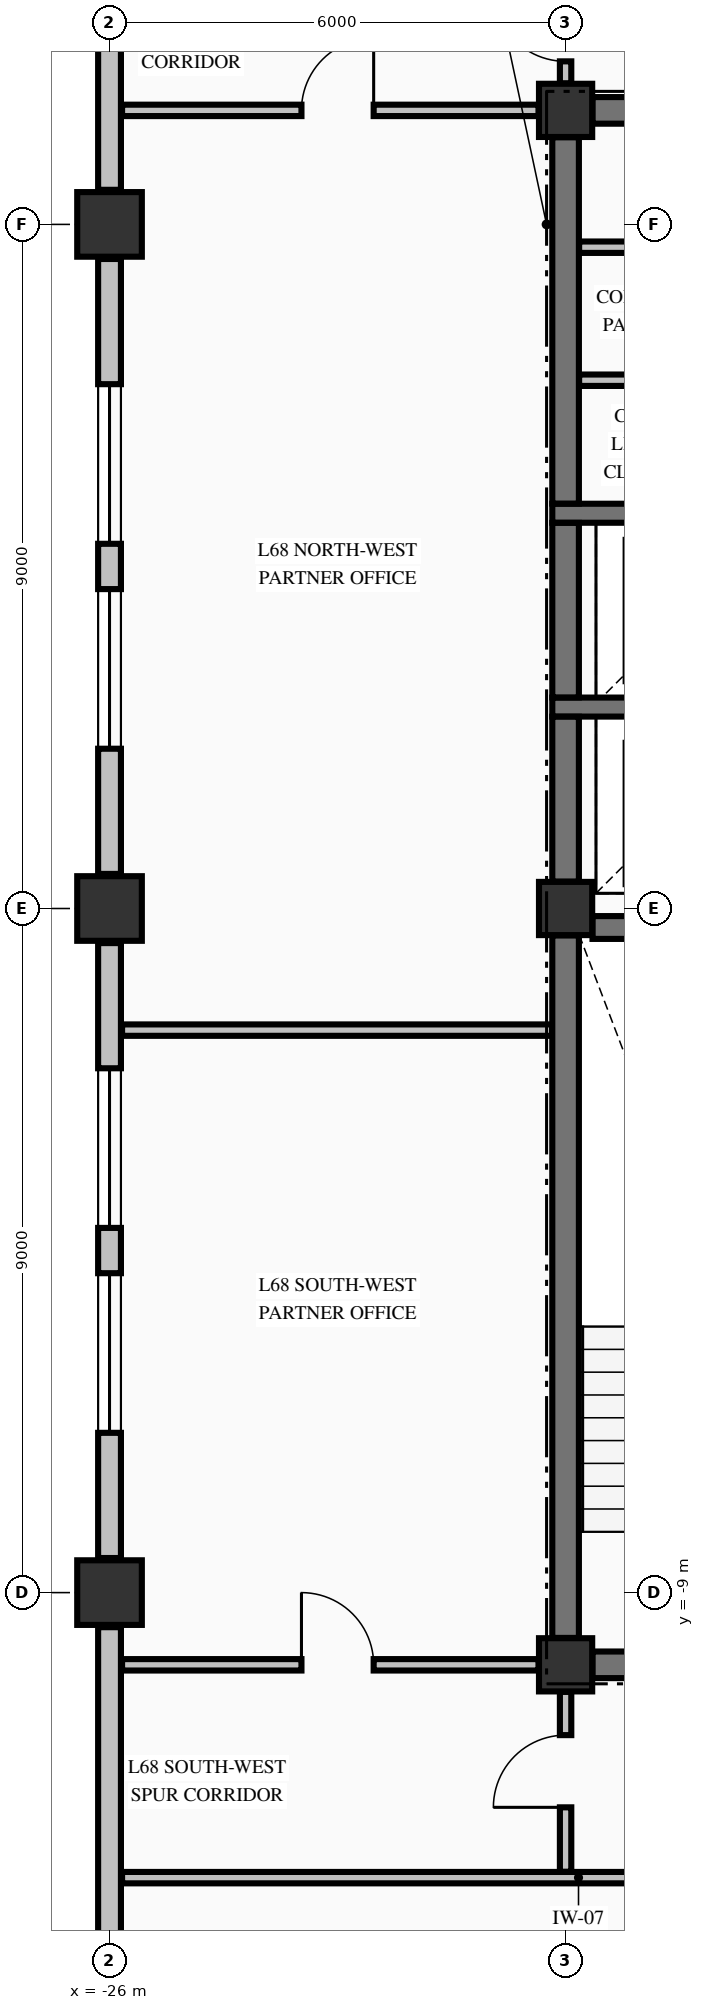
"""IFC4 building model, lengths in metres.
Left out: names, types, materials, properties, quantities, classifications, styles, units other than length and angle.
Written with IfcOpenShell. Run it as: python <this file> out.ifc"""

import sys

from ifc_helpers import new_model, si_unit, direction, frame, frame_2d, origin, origin_2d, place, context, subcontext, project, spatial, rectangle, extrude, element, fill, save


model = new_model("IFC4")
c1 = context("Model", 3, precision=1e-05, world=origin(), true_north=direction((0.0, 1.0)))
c2 = subcontext(c1, "Body", "Model", "MODEL_VIEW")
j1 = project(units=[si_unit("LENGTHUNIT", "METRE"), si_unit("PLANEANGLEUNIT", "RADIAN")], contexts=[c1])
p1 = place(None, origin())
s1 = spatial("IfcSite", under=j1, at=p1, CompositionType="ELEMENT")
p2 = place(p1, origin())
s2 = spatial("IfcBuilding", under=s1, at=p2, CompositionType="ELEMENT")
p3 = place(p2, frame((0.0, 0.0, 257.66)))
s3 = spatial("IfcBuildingStorey", under=s2, at=p3, CompositionType="ELEMENT", Elevation=257.66)
for number, where, z_axis, x_axis in (
    (1, (-26.0, -9.0, -0.25), (0.0, 0.0, 1.0), (1.0, 0.0, 0.0)),
    (2, (-26.0, 0.0, -0.25), (0.0, 0.0, 1.0), (1.0, 0.0, 0.0)),
    (3, (-26.0, 9.0, -0.25), (0.0, 0.0, 1.0), (1.0, 0.0, 0.0)),
):
    element("IfcColumn", number, at=place(p3, frame(where, z_axis=z_axis, x_axis=x_axis)), inside=s3, PredefinedType="COLUMN", context=c2, shape_type="SweptSolid", body=[
        extrude(rectangle(XDim=0.85, YDim=0.85, at=origin_2d()), origin(), (0.0, 0.0, 1.0), 3.23),
    ])
for number, where, z_axis, x_axis in (
    (4, (-20.0, -9.95, -0.25), (0.0, 0.0, 1.0), (1.0, 0.0, 0.0)),
    (5, (-20.0, 10.5, -0.25), (0.0, 0.0, 1.0), (1.0, 0.0, 0.0)),
    (6, (-20.0, 0.0, -0.25), (0.0, 0.0, 1.0), (1.0, 0.0, 0.0)),
):
    element("IfcColumn", number, at=place(p3, frame(where, z_axis=z_axis, x_axis=x_axis)), inside=s3, PredefinedType="COLUMN", context=c2, shape_type="SweptSolid", body=[
        extrude(rectangle(XDim=0.7, YDim=0.7, at=origin_2d()), origin(), (0.0, 0.0, 1.0), 3.23),
    ])
p4 = place(p3, frame((-26.0, -9.455, 0.0), z_axis=(0.0, 0.0, 1.0), x_axis=(0.0, -1.0, 0.0)))
e7 = element("IfcWall", 7, at=p4, inside=s3, PredefinedType="STANDARD", context=c2, shape_type="SweptSolid", body=[
    extrude(rectangle(XDim=8.09, YDim=0.3, at=frame_2d((4.045, 0.0))), origin(), (0.0, 0.0, 1.0), 2.372),
])
p5 = place(p3, frame((-26.0, -0.455, 0.0), z_axis=(0.0, 0.0, 1.0), x_axis=(0.0, -1.0, 0.0)))
e8 = element("IfcWall", 8, at=p5, inside=s3, PredefinedType="STANDARD", context=c2, shape_type="SweptSolid", body=[
    extrude(rectangle(XDim=8.09, YDim=0.3, at=frame_2d((4.045, 0.0))), origin(), (0.0, 0.0, 1.0), 2.372),
])
p6 = place(p5, frame((1.647, 0.0, 0.7)))
e9 = element("IfcOpeningElement", 9, at=p6, cuts=e8, PredefinedType="OPENING", context=c2, shape_type="SweptSolid", body=[
    extrude(rectangle(XDim=2.1, YDim=1.5, at=frame_2d((1.05, 0.75))), frame((0.0, 0.16, 0.0), z_axis=(0.0, -1.0, 0.0), x_axis=(1.0, 0.0, 0.0)), (0.0, 0.0, 1.0), 0.32),
])
p7 = place(p5, frame((4.343, 0.0, 0.7)))
e10 = element("IfcOpeningElement", 10, at=p7, cuts=e8, PredefinedType="OPENING", context=c2, shape_type="SweptSolid", body=[
    extrude(rectangle(XDim=2.1, YDim=1.5, at=frame_2d((1.05, 0.75))), frame((0.0, 0.16, 0.0), z_axis=(0.0, -1.0, 0.0), x_axis=(1.0, 0.0, 0.0)), (0.0, 0.0, 1.0), 0.32),
])
p8 = place(p3, frame((-26.0, 8.545, 0.0), z_axis=(0.0, 0.0, 1.0), x_axis=(0.0, -1.0, 0.0)))
e11 = element("IfcWall", 11, at=p8, inside=s3, PredefinedType="STANDARD", context=c2, shape_type="SweptSolid", body=[
    extrude(rectangle(XDim=8.09, YDim=0.3, at=frame_2d((4.045, 0.0))), origin(), (0.0, 0.0, 1.0), 2.372),
])
p9 = place(p8, frame((1.647, 0.0, 0.7)))
e12 = element("IfcOpeningElement", 12, at=p9, cuts=e11, PredefinedType="OPENING", context=c2, shape_type="SweptSolid", body=[
    extrude(rectangle(XDim=2.1, YDim=1.5, at=frame_2d((1.05, 0.75))), frame((0.0, 0.16, 0.0), z_axis=(0.0, -1.0, 0.0), x_axis=(1.0, 0.0, 0.0)), (0.0, 0.0, 1.0), 0.32),
])
p10 = place(p8, frame((4.343, 0.0, 0.7)))
e13 = element("IfcOpeningElement", 13, at=p10, cuts=e11, PredefinedType="OPENING", context=c2, shape_type="SweptSolid", body=[
    extrude(rectangle(XDim=2.1, YDim=1.5, at=frame_2d((1.05, 0.75))), frame((0.0, 0.16, 0.0), z_axis=(0.0, -1.0, 0.0), x_axis=(1.0, 0.0, 0.0)), (0.0, 0.0, 1.0), 0.32),
])
p11 = place(p3, frame((-26.0, 17.545, 0.0), z_axis=(0.0, 0.0, 1.0), x_axis=(0.0, -1.0, 0.0)))
e14 = element("IfcWall", 14, at=p11, inside=s3, PredefinedType="STANDARD", context=c2, shape_type="SweptSolid", body=[
    extrude(rectangle(XDim=8.09, YDim=0.3, at=frame_2d((4.045, 0.0))), origin(), (0.0, 0.0, 1.0), 2.372),
])
p12 = place(p3, frame((-19.646, -9.95, 0.0), z_axis=(0.0, 0.0, 1.0), x_axis=(1.0, 0.0, 0.0)))
e15 = element("IfcWall", 15, at=p12, inside=s3, PredefinedType="SHEAR", context=c2, shape_type="SweptSolid", body=[
    extrude(rectangle(XDim=4.946, YDim=0.35, at=frame_2d((2.473, 0.0))), origin(), (0.0, 0.0, 1.0), 2.98),
])
p13 = place(p12, frame((0.821, 0.0, 0.0)))
e16 = element("IfcOpeningElement", 16, at=p13, cuts=e15, PredefinedType="OPENING", context=c2, shape_type="SweptSolid", body=[
    extrude(rectangle(XDim=1.05, YDim=2.15, at=frame_2d((0.525, 1.075))), frame((0.0, 0.185, 0.0), z_axis=(0.0, -1.0, 0.0), x_axis=(1.0, 0.0, 0.0)), (0.0, 0.0, 1.0), 0.37),
])
p14 = place(p3, frame((-19.646, -0.25, 0.0), z_axis=(0.0, 0.0, 1.0), x_axis=(1.0, 0.0, 0.0)))
e17 = element("IfcWall", 17, at=p14, inside=s3, PredefinedType="SHEAR", context=c2, shape_type="SweptSolid", body=[
    extrude(rectangle(XDim=8.292, YDim=0.3, at=frame_2d((4.146, 0.0))), origin(), (0.0, 0.0, 1.0), 2.98),
])
p15 = place(p14, frame((5.946, 0.0, 0.0)))
e18 = element("IfcOpeningElement", 18, at=p15, cuts=e17, PredefinedType="OPENING", context=c2, shape_type="SweptSolid", body=[
    extrude(rectangle(XDim=1.1, YDim=2.15, at=frame_2d((0.55, 1.075))), frame((0.0, 0.16, 0.0), z_axis=(0.0, -1.0, 0.0), x_axis=(1.0, 0.0, 0.0)), (0.0, 0.0, 1.0), 0.32),
])
for number, where, z_axis, x_axis in (
    (19, (-20.175, 2.65, 0.0), (0.0, 0.0, 1.0), (1.0, 0.0, 0.0)),
    (20, (-20.175, 5.2, 0.0), (0.0, 0.0, 1.0), (1.0, 0.0, 0.0)),
):
    element("IfcWall", number, at=place(p3, frame(where, z_axis=z_axis, x_axis=x_axis)), inside=s3, PredefinedType="SOLIDWALL", context=c2, shape_type="SweptSolid", body=[
        extrude(rectangle(XDim=3.2, YDim=0.25, at=frame_2d((1.6, 0.0))), origin(), (0.0, 0.0, 1.0), 2.98),
    ])
p16 = place(p3, frame((-19.646, 10.5, 0.0), z_axis=(0.0, 0.0, 1.0), x_axis=(1.0, 0.0, 0.0)))
e21 = element("IfcWall", 21, at=p16, inside=s3, PredefinedType="SHEAR", context=c2, shape_type="SweptSolid", body=[
    extrude(rectangle(XDim=4.946, YDim=0.35, at=frame_2d((2.473, 0.0))), origin(), (0.0, 0.0, 1.0), 2.98),
])
p17 = place(p16, frame((3.196, 0.0, 0.0)))
e22 = element("IfcOpeningElement", 22, at=p17, cuts=e21, PredefinedType="OPENING", context=c2, shape_type="SweptSolid", body=[
    extrude(rectangle(XDim=1.1, YDim=2.15, at=frame_2d((0.55, 1.075))), frame((0.0, 0.185, 0.0), z_axis=(0.0, -1.0, 0.0), x_axis=(1.0, 0.0, 0.0)), (0.0, 0.0, 1.0), 0.37),
])
p18 = place(p3, frame((-25.835, -12.75, 0.0), z_axis=(0.0, 0.0, 1.0), x_axis=(1.0, 0.0, 0.0)))
e23 = element("IfcWall", 23, at=p18, inside=s3, PredefinedType="PARTITIONING", context=c2, shape_type="SweptSolid", body=[
    extrude(rectangle(XDim=45.91, YDim=0.15, at=frame_2d((22.955, 0.0))), origin(), (0.0, 0.0, 1.0), 2.98),
])
p19 = place(p18, frame((12.01, 0.0, 0.0)))
e24 = element("IfcOpeningElement", 24, at=p19, cuts=e23, PredefinedType="OPENING", context=c2, shape_type="SweptSolid", body=[
    extrude(rectangle(XDim=1.05, YDim=2.15, at=frame_2d((0.525, 1.075))), frame((0.0, 0.085, 0.0), z_axis=(0.0, -1.0, 0.0), x_axis=(1.0, 0.0, 0.0)), (0.0, 0.0, 1.0), 0.17),
])
p20 = place(p18, frame((23.11, 0.0, 0.0)))
e25 = element("IfcOpeningElement", 25, at=p20, cuts=e23, PredefinedType="OPENING", context=c2, shape_type="SweptSolid", body=[
    extrude(rectangle(XDim=1.05, YDim=2.15, at=frame_2d((0.525, 1.075))), frame((0.0, 0.085, 0.0), z_axis=(0.0, -1.0, 0.0), x_axis=(1.0, 0.0, 0.0)), (0.0, 0.0, 1.0), 0.17),
])
p21 = place(p18, frame((34.26, 0.0, 0.0)))
e26 = element("IfcOpeningElement", 26, at=p21, cuts=e23, PredefinedType="OPENING", context=c2, shape_type="SweptSolid", body=[
    extrude(rectangle(XDim=1.05, YDim=2.15, at=frame_2d((0.525, 1.075))), frame((0.0, 0.085, 0.0), z_axis=(0.0, -1.0, 0.0), x_axis=(1.0, 0.0, 0.0)), (0.0, 0.0, 1.0), 0.17),
])
p22 = place(p3, frame((-25.835, -9.95, 0.0), z_axis=(0.0, 0.0, 1.0), x_axis=(1.0, 0.0, 0.0)))
e27 = element("IfcWall", 27, at=p22, inside=s3, PredefinedType="PARTITIONING", context=c2, shape_type="SweptSolid", body=[
    extrude(rectangle(XDim=5.479, YDim=0.15, at=frame_2d((2.74, 0.0))), origin(), (0.0, 0.0, 1.0), 2.98),
])
p23 = place(p22, frame((2.36, 0.0, 0.0)))
e28 = element("IfcOpeningElement", 28, at=p23, cuts=e27, PredefinedType="OPENING", context=c2, shape_type="SweptSolid", body=[
    extrude(rectangle(XDim=0.95, YDim=2.15, at=frame_2d((0.475, 1.075))), frame((0.0, 0.085, 0.0), z_axis=(0.0, -1.0, 0.0), x_axis=(1.0, 0.0, 0.0)), (0.0, 0.0, 1.0), 0.17),
])
p24 = place(p3, frame((-25.835, -1.6, 0.0), z_axis=(0.0, 0.0, 1.0), x_axis=(1.0, 0.0, 0.0)))
e29 = element("IfcWall", 29, at=p24, inside=s3, PredefinedType="PARTITIONING", context=c2, shape_type="SweptSolid", body=[
    extrude(rectangle(XDim=5.657, YDim=0.15, at=frame_2d((2.829, 0.0))), origin(), (0.0, 0.0, 1.0), 2.98),
])
for number, where, z_axis, x_axis in (
    (30, (-19.822, 6.95, 0.0), (0.0, 0.0, 1.0), (1.0, 0.0, 0.0)),
    (31, (-19.822, 8.7, 0.0), (0.0, 0.0, 1.0), (1.0, 0.0, 0.0)),
):
    element("IfcWall", number, at=place(p3, frame(where, z_axis=z_axis, x_axis=x_axis)), inside=s3, PredefinedType="PARTITIONING", context=c2, shape_type="SweptSolid", body=[
        extrude(rectangle(XDim=2.822, YDim=0.15, at=frame_2d((1.411, 0.0))), origin(), (0.0, 0.0, 1.0), 2.98),
    ])
p25 = place(p3, frame((-25.835, 10.5, 0.0), z_axis=(0.0, 0.0, 1.0), x_axis=(1.0, 0.0, 0.0)))
e32 = element("IfcWall", 32, at=p25, inside=s3, PredefinedType="PARTITIONING", context=c2, shape_type="SweptSolid", body=[
    extrude(rectangle(XDim=5.479, YDim=0.15, at=frame_2d((2.74, 0.0))), origin(), (0.0, 0.0, 1.0), 2.98),
])
p26 = place(p25, frame((2.36, 0.0, 0.0)))
e33 = element("IfcOpeningElement", 33, at=p26, cuts=e32, PredefinedType="OPENING", context=c2, shape_type="SweptSolid", body=[
    extrude(rectangle(XDim=0.95, YDim=2.15, at=frame_2d((0.475, 1.075))), frame((0.0, 0.085, 0.0), z_axis=(0.0, -1.0, 0.0), x_axis=(1.0, 0.0, 0.0)), (0.0, 0.0, 1.0), 0.17),
])
p27 = place(p3, frame((-20.0, -9.596, 0.0), z_axis=(0.0, 0.0, 1.0), x_axis=(0.0, 1.0, 0.0)))
e34 = element("IfcWall", 34, at=p27, inside=s3, PredefinedType="SHEAR", context=c2, shape_type="SweptSolid", body=[
    extrude(rectangle(XDim=9.242, YDim=0.35, at=frame_2d((4.621, 0.0))), origin(), (0.0, 0.0, 1.0), 2.98),
])
p28 = place(p3, frame((-20.0, 0.354, 0.0), z_axis=(0.0, 0.0, 1.0), x_axis=(0.0, 1.0, 0.0)))
e35 = element("IfcWall", 35, at=p28, inside=s3, PredefinedType="SHEAR", context=c2, shape_type="SweptSolid", body=[
    extrude(rectangle(XDim=2.169, YDim=0.35, at=frame_2d((1.084, 0.0))), origin(), (0.0, 0.0, 1.0), 2.98),
])
p29 = place(p3, frame((-20.0, 2.777, 0.0), z_axis=(0.0, 0.0, 1.0), x_axis=(0.0, 1.0, 0.0)))
e36 = element("IfcWall", 36, at=p29, inside=s3, PredefinedType="SHEAR", context=c2, shape_type="SweptSolid", body=[
    extrude(rectangle(XDim=2.296, YDim=0.35, at=frame_2d((1.148, 0.0))), origin(), (0.0, 0.0, 1.0), 2.98),
])
p30 = place(p3, frame((-20.0, 5.327, 0.0), z_axis=(0.0, 0.0, 1.0), x_axis=(0.0, 1.0, 0.0)))
e37 = element("IfcWall", 37, at=p30, inside=s3, PredefinedType="SHEAR", context=c2, shape_type="SweptSolid", body=[
    extrude(rectangle(XDim=4.819, YDim=0.35, at=frame_2d((2.41, 0.0))), origin(), (0.0, 0.0, 1.0), 2.98),
])
p31 = place(p3, frame((-20.0, -12.672, 0.0), z_axis=(0.0, 0.0, 1.0), x_axis=(0.0, 1.0, 0.0)))
e38 = element("IfcWall", 38, at=p31, inside=s3, PredefinedType="PARTITIONING", context=c2, shape_type="SweptSolid", body=[
    extrude(rectangle(XDim=2.366, YDim=0.15, at=frame_2d((1.183, 0.0))), origin(), (0.0, 0.0, 1.0), 2.98),
])
p32 = place(p31, frame((0.847, 0.0, 0.0)))
e39 = element("IfcOpeningElement", 39, at=p32, cuts=e38, PredefinedType="OPENING", context=c2, shape_type="SweptSolid", body=[
    extrude(rectangle(XDim=0.95, YDim=2.15, at=frame_2d((0.475, 1.075))), frame((0.0, 0.085, 0.0), z_axis=(0.0, -1.0, 0.0), x_axis=(1.0, 0.0, 0.0)), (0.0, 0.0, 1.0), 0.17),
])
p33 = place(p3, frame((-20.0, 10.856, 0.0), z_axis=(0.0, 0.0, 1.0), x_axis=(0.0, 1.0, 0.0)))
e40 = element("IfcWall", 40, at=p33, inside=s3, PredefinedType="PARTITIONING", context=c2, shape_type="SweptSolid", body=[
    extrude(rectangle(XDim=1.816, YDim=0.15, at=frame_2d((0.908, 0.0))), origin(), (0.0, 0.0, 1.0), 2.98),
])
p34 = place(p33, frame((0.289, 0.0, 0.0)))
e41 = element("IfcOpeningElement", 41, at=p34, cuts=e40, PredefinedType="OPENING", context=c2, shape_type="SweptSolid", body=[
    extrude(rectangle(XDim=0.95, YDim=2.15, at=frame_2d((0.475, 1.075))), frame((0.0, 0.085, 0.0), z_axis=(0.0, -1.0, 0.0), x_axis=(1.0, 0.0, 0.0)), (0.0, 0.0, 1.0), 0.17),
])
p35 = place(p6, origin())
e42 = element("IfcWindow", 42, at=p35, inside=s3, PartitioningType="SINGLE_PANEL", PredefinedType="WINDOW", context=c2, shape_type="SweptSolid", body=[
    extrude(rectangle(XDim=2.1, YDim=1.5, at=frame_2d((1.05, 0.75))), frame((0.0, 0.03, 0.0), z_axis=(0.0, -1.0, 0.0), x_axis=(1.0, 0.0, 0.0)), (0.0, 0.0, 1.0), 0.06),
])
fill(e9, e42)
p36 = place(p7, origin())
e43 = element("IfcWindow", 43, at=p36, inside=s3, PartitioningType="SINGLE_PANEL", PredefinedType="WINDOW", context=c2, shape_type="SweptSolid", body=[
    extrude(rectangle(XDim=2.1, YDim=1.5, at=frame_2d((1.05, 0.75))), frame((0.0, 0.03, 0.0), z_axis=(0.0, -1.0, 0.0), x_axis=(1.0, 0.0, 0.0)), (0.0, 0.0, 1.0), 0.06),
])
fill(e10, e43)
p37 = place(p9, origin())
e44 = element("IfcWindow", 44, at=p37, inside=s3, PartitioningType="SINGLE_PANEL", PredefinedType="WINDOW", context=c2, shape_type="SweptSolid", body=[
    extrude(rectangle(XDim=2.1, YDim=1.5, at=frame_2d((1.05, 0.75))), frame((0.0, 0.03, 0.0), z_axis=(0.0, -1.0, 0.0), x_axis=(1.0, 0.0, 0.0)), (0.0, 0.0, 1.0), 0.06),
])
fill(e12, e44)
p38 = place(p10, origin())
e45 = element("IfcWindow", 45, at=p38, inside=s3, PartitioningType="SINGLE_PANEL", PredefinedType="WINDOW", context=c2, shape_type="SweptSolid", body=[
    extrude(rectangle(XDim=2.1, YDim=1.5, at=frame_2d((1.05, 0.75))), frame((0.0, 0.03, 0.0), z_axis=(0.0, -1.0, 0.0), x_axis=(1.0, 0.0, 0.0)), (0.0, 0.0, 1.0), 0.06),
])
fill(e13, e45)
p39 = place(p34, origin())
e46 = element("IfcDoor", 46, at=p39, inside=s3, OperationType="SINGLE_SWING_RIGHT", PredefinedType="DOOR", context=c2, shape_type="SweptSolid", body=[
    extrude(rectangle(XDim=0.95, YDim=2.15, at=frame_2d((0.475, 1.075))), frame((0.0, 0.025, 0.0), z_axis=(0.0, -1.0, 0.0), x_axis=(1.0, 0.0, 0.0)), (0.0, 0.0, 1.0), 0.05),
])
fill(e41, e46)
p40 = place(p32, origin())
e47 = element("IfcDoor", 47, at=p40, inside=s3, OperationType="SINGLE_SWING_LEFT", PredefinedType="DOOR", context=c2, shape_type="SweptSolid", body=[
    extrude(rectangle(XDim=0.95, YDim=2.15, at=frame_2d((0.475, 1.075))), frame((0.0, 0.025, 0.0), z_axis=(0.0, -1.0, 0.0), x_axis=(1.0, 0.0, 0.0)), (0.0, 0.0, 1.0), 0.05),
])
fill(e39, e47)
p41 = place(p26, origin())
e48 = element("IfcDoor", 48, at=p41, inside=s3, OperationType="SINGLE_SWING_RIGHT", PredefinedType="DOOR", context=c2, shape_type="SweptSolid", body=[
    extrude(rectangle(XDim=0.95, YDim=2.15, at=frame_2d((0.475, 1.075))), frame((0.0, 0.025, 0.0), z_axis=(0.0, -1.0, 0.0), x_axis=(1.0, 0.0, 0.0)), (0.0, 0.0, 1.0), 0.05),
])
fill(e33, e48)
p42 = place(p23, origin())
e49 = element("IfcDoor", 49, at=p42, inside=s3, OperationType="SINGLE_SWING_LEFT", PredefinedType="DOOR", context=c2, shape_type="SweptSolid", body=[
    extrude(rectangle(XDim=0.95, YDim=2.15, at=frame_2d((0.475, 1.075))), frame((0.0, 0.025, 0.0), z_axis=(0.0, -1.0, 0.0), x_axis=(1.0, 0.0, 0.0)), (0.0, 0.0, 1.0), 0.05),
])
fill(e28, e49)
save(model, sys.argv[1])
